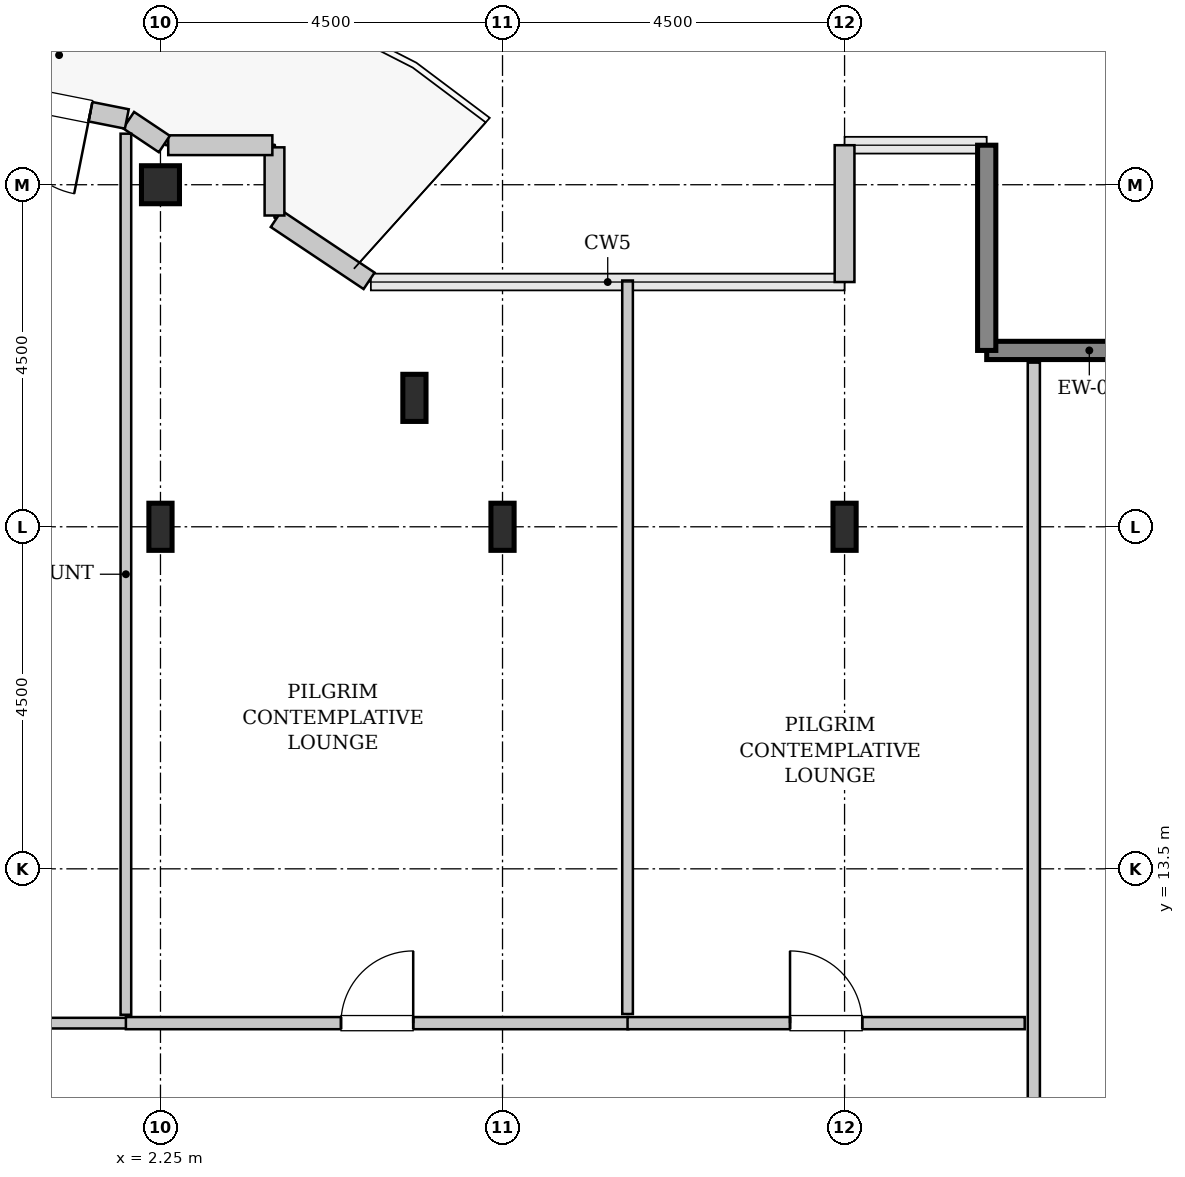
"""IFC4 building model, lengths in metres.
Left out: names, types, materials, properties, quantities, classifications, styles, units other than length and angle.
Written with IfcOpenShell. Run it as: python <this file> out.ifc"""

import sys

from ifc_helpers import new_model, si_unit, direction, frame, frame_2d, origin, origin_2d, place, context, subcontext, project, spatial, rectangle, hollow_rectangle, i_section, extrude, source, transform, mapped, element, fill, save


model = new_model("IFC4")
c1 = context("Model", 3, precision=1e-05, world=origin(), true_north=direction((0.0, 1.0)))
c2 = subcontext(c1, "Body", "Model", "MODEL_VIEW")
j1 = project(units=[si_unit("LENGTHUNIT", "METRE"), si_unit("PLANEANGLEUNIT", "RADIAN")], contexts=[c1])
p1 = place(None, origin())
s1 = spatial("IfcSite", under=j1, at=p1, CompositionType="ELEMENT")
p2 = place(p1, origin())
s2 = spatial("IfcBuilding", under=s1, at=p2, CompositionType="ELEMENT")
p3 = place(p2, frame((0.0, 0.0, 306.4)))
s3 = spatial("IfcBuildingStorey", under=s2, at=p3, CompositionType="ELEMENT", Elevation=306.4)
m1 = source(origin(), c2, "Body", "SweptSolid", [
    extrude(i_section(OverallWidth=0.305, OverallDepth=0.62, WebThickness=0.021, FlangeThickness=0.04, FilletRadius=0.027, at=origin_2d()), origin(), (0.0, 0.0, 1.0), 3.8),
])
p4 = place(p3, frame((2.25, 18.0, 0.0), z_axis=(0.0, 0.0, 1.0), x_axis=(1.0, 0.0, 0.0)))
e1 = element("IfcColumn", 1, at=p4, inside=s3, PredefinedType="COLUMN", context=c2, shape_type="MappedRepresentation", body=[
    mapped(m1, transform((0.0, 0.0, 0.0), x_axis=(1.0, 0.0, 0.0), y_axis=(0.0, 1.0, 0.0), z_axis=(0.0, 0.0, 1.0), scale=1.0)),
])
m2 = source(origin(), c2, "Body", "SweptSolid", [
    extrude(hollow_rectangle(XDim=0.5, YDim=0.5, WallThickness=0.025, InnerFilletRadius=0.025, OuterFilletRadius=0.05, at=origin_2d()), origin(), (0.0, 0.0, 1.0), 3.8),
])
p5 = place(p3, frame((2.25, 22.5, 0.0), z_axis=(0.0, 0.0, 1.0), x_axis=(1.0, 0.0, 0.0)))
e2 = element("IfcColumn", 2, at=p5, inside=s3, PredefinedType="COLUMN", context=c2, shape_type="MappedRepresentation", body=[
    mapped(m2, transform((0.0, 0.0, 0.0), x_axis=(1.0, 0.0, 0.0), y_axis=(0.0, 1.0, 0.0), z_axis=(0.0, 0.0, 1.0), scale=1.0)),
])
for number, where, z_axis, x_axis in (
    (3, (5.591, 19.696, 0.0), (0.0, 0.0, 1.0), (1.0, 0.0, 0.0)),
    (4, (6.75, 18.0, 0.0), (0.0, 0.0, 1.0), (1.0, 0.0, 0.0)),
    (5, (11.25, 18.0, 0.0), (0.0, 0.0, 1.0), (1.0, 0.0, 0.0)),
):
    element("IfcColumn", number, at=place(p3, frame(where, z_axis=z_axis, x_axis=x_axis)), inside=s3, PredefinedType="COLUMN", context=c2, shape_type="MappedRepresentation", body=[
        mapped(m1, transform((0.0, 0.0, 0.0), x_axis=(1.0, 0.0, 0.0), y_axis=(0.0, 1.0, 0.0), z_axis=(0.0, 0.0, 1.0), scale=1.0)),
    ])
m3 = source(origin(), c2, "Body", "SweptSolid", [
    extrude(rectangle(XDim=2.7, YDim=0.24, at=frame_2d((1.35, 0.0))), origin(), (0.0, 0.0, 1.0), 3.55),
])
for number, where, z_axis, x_axis in (
    (6, (15.82, 20.32, 0.0), (0.0, 0.0, 1.0), (-1.0, 0.0, 0.0)),
    (7, (13.12, 20.32, 0.0), (0.0, 0.0, 1.0), (0.0, 1.0, 0.0)),
):
    element("IfcWall", number, at=place(p3, frame(where, z_axis=z_axis, x_axis=x_axis)), inside=s3, PredefinedType="SHEAR", context=c2, shape_type="MappedRepresentation", body=[
        mapped(m3, transform((0.0, 0.0, 0.0), x_axis=(1.0, 0.0, 0.0), y_axis=(0.0, 1.0, 0.0), z_axis=(0.0, 0.0, 1.0), scale=1.0)),
    ])
m4 = source(origin(), c2, "Body", "SweptSolid", [
    extrude(rectangle(XDim=1.8, YDim=0.26, at=frame_2d((0.9, 0.0))), origin(), (0.0, 0.0, 1.0), 3.55),
])
p6 = place(p3, frame((11.25, 23.02, 0.0), z_axis=(0.0, 0.0, 1.0), x_axis=(0.0, -1.0, 0.0)))
e8 = element("IfcWall", 8, at=p6, inside=s3, PredefinedType="SOLIDWALL", context=c2, shape_type="MappedRepresentation", body=[
    mapped(m4, transform((0.0, 0.0, 0.0), x_axis=(1.0, 0.0, 0.0), y_axis=(0.0, 1.0, 0.0), z_axis=(0.0, 0.0, 1.0), scale=1.0)),
])
m5 = source(origin(), c2, "Body", "SweptSolid", [
    extrude(rectangle(XDim=1.469, YDim=0.26, at=frame_2d((0.734, 0.0))), origin(), (0.0, 0.0, 1.0), 3.55),
])
p7 = place(p3, frame((4.995, 21.236, 0.0), z_axis=(0.0, 0.0, 1.0), x_axis=(-0.831461760506, 0.555581983884, 0.0)))
e9 = element("IfcWall", 9, at=p7, inside=s3, PredefinedType="SOLIDWALL", context=c2, shape_type="MappedRepresentation", body=[
    mapped(m5, transform((0.0, 0.0, 0.0), x_axis=(1.0, 0.0, 0.0), y_axis=(0.0, 1.0, 0.0), z_axis=(0.0, 0.0, 1.0), scale=1.0)),
])
m6 = source(origin(), c2, "Body", "SweptSolid", [
    extrude(rectangle(XDim=0.897, YDim=0.26, at=frame_2d((0.448, 0.0))), origin(), (0.0, 0.0, 1.0), 3.55),
])
p8 = place(p3, frame((3.75, 22.095, 0.0), z_axis=(0.0, 0.0, 1.0), x_axis=(0.0, 1.0, 0.0)))
e10 = element("IfcWall", 10, at=p8, inside=s3, PredefinedType="SOLIDWALL", context=c2, shape_type="MappedRepresentation", body=[
    mapped(m6, transform((0.0, 0.0, 0.0), x_axis=(1.0, 0.0, 0.0), y_axis=(0.0, 1.0, 0.0), z_axis=(0.0, 0.0, 1.0), scale=1.0)),
])
m7 = source(origin(), c2, "Body", "SweptSolid", [
    extrude(rectangle(XDim=1.37, YDim=0.26, at=frame_2d((0.685, 0.0))), origin(), (0.0, 0.0, 1.0), 3.55),
])
p9 = place(p3, frame((3.722, 23.02, 0.0), z_axis=(0.0, 0.0, 1.0), x_axis=(-1.0, 0.0, 0.0)))
e11 = element("IfcWall", 11, at=p9, inside=s3, PredefinedType="SOLIDWALL", context=c2, shape_type="MappedRepresentation", body=[
    mapped(m7, transform((0.0, 0.0, 0.0), x_axis=(1.0, 0.0, 0.0), y_axis=(0.0, 1.0, 0.0), z_axis=(0.0, 0.0, 1.0), scale=1.0)),
])
m8 = source(origin(), c2, "Body", "SweptSolid", [
    extrude(rectangle(XDim=0.565, YDim=0.26, at=frame_2d((0.283, 0.0))), origin(), (0.0, 0.0, 1.0), 3.55),
])
p10 = place(p3, frame((2.301, 23.036, 0.0), z_axis=(0.0, 0.0, 1.0), x_axis=(-0.831651492666, 0.555297933317, 0.0)))
e12 = element("IfcWall", 12, at=p10, inside=s3, PredefinedType="SOLIDWALL", context=c2, shape_type="MappedRepresentation", body=[
    mapped(m8, transform((0.0, 0.0, 0.0), x_axis=(1.0, 0.0, 0.0), y_axis=(0.0, 1.0, 0.0), z_axis=(0.0, 0.0, 1.0), scale=1.0)),
])
m9 = source(origin(), c2, "Body", "SweptSolid", [
    extrude(rectangle(XDim=4.137, YDim=0.26, at=frame_2d((2.068, 0.0))), origin(), (0.0, 0.0, 1.0), 3.55),
])
p11 = place(p3, frame((1.807, 23.365, 0.0), z_axis=(0.0, 0.0, 1.0), x_axis=(-0.980782170794, 0.195105954428, 0.0)))
e13 = element("IfcWall", 13, at=p11, inside=s3, PredefinedType="SOLIDWALL", context=c2, shape_type="MappedRepresentation", body=[
    mapped(m9, transform((0.0, 0.0, 0.0), x_axis=(1.0, 0.0, 0.0), y_axis=(0.0, 1.0, 0.0), z_axis=(0.0, 0.0, 1.0), scale=1.0)),
])
p12 = place(p11, frame((0.488, 0.0, 0.0)))
e14 = element("IfcOpeningElement", 14, at=p12, cuts=e13, PredefinedType="OPENING", context=c2, shape_type="SweptSolid", body=[
    extrude(rectangle(XDim=1.1, YDim=2.2, at=frame_2d((0.55, 1.1))), frame((0.0, 0.14, 0.0), z_axis=(0.0, -1.0, 0.0), x_axis=(1.0, 0.0, 0.0)), (0.0, 0.0, 1.0), 0.28),
])
m10 = source(origin(), c2, "Body", "SweptSolid", [
    extrude(rectangle(XDim=12.922, YDim=0.16, at=frame_2d((6.461, 0.0))), origin(), (0.0, 0.0, 1.0), 3.535),
])
p13 = place(p3, frame((13.74, 7.238, 0.0), z_axis=(0.0, 0.0, 1.0), x_axis=(0.0, 1.0, 0.0)))
e15 = element("IfcWall", 15, at=p13, inside=s3, PredefinedType="PARTITIONING", context=c2, shape_type="MappedRepresentation", body=[
    mapped(m10, transform((0.0, 0.0, 0.0), x_axis=(1.0, 0.0, 0.0), y_axis=(0.0, 1.0, 0.0), z_axis=(0.0, 0.0, 1.0), scale=1.0)),
])
p14 = place(p13, frame((1.661, 0.0, 0.0)))
e16 = element("IfcOpeningElement", 16, at=p14, cuts=e15, PredefinedType="OPENING", context=c2, shape_type="SweptSolid", body=[
    extrude(rectangle(XDim=0.95, YDim=2.1, at=frame_2d((0.475, 1.05))), frame((0.0, 0.09, 0.0), z_axis=(0.0, -1.0, 0.0), x_axis=(1.0, 0.0, 0.0)), (0.0, 0.0, 1.0), 0.18),
])
m11 = source(origin(), c2, "Body", "SweptSolid", [
    extrude(rectangle(XDim=4.625, YDim=0.14, at=frame_2d((2.312, 0.0))), origin(), (0.0, 0.0, 1.0), 3.535),
])
p15 = place(p3, frame((-2.82, 11.47, 0.0), z_axis=(0.0, 0.0, 1.0), x_axis=(1.0, 0.0, 0.0)))
e17 = element("IfcWall", 17, at=p15, inside=s3, PredefinedType="PARTITIONING", context=c2, shape_type="MappedRepresentation", body=[
    mapped(m11, transform((0.0, 0.0, 0.0), x_axis=(1.0, 0.0, 0.0), y_axis=(0.0, 1.0, 0.0), z_axis=(0.0, 0.0, 1.0), scale=1.0)),
])
m12 = source(origin(), c2, "Body", "SweptSolid", [
    extrude(rectangle(XDim=11.591, YDim=0.14, at=frame_2d((5.796, 0.0))), origin(), (0.0, 0.0, 1.0), 2.975),
])
p16 = place(p3, frame((1.795, 11.58, 0.0), z_axis=(0.0, 0.0, 1.0), x_axis=(0.0, 1.0, 0.0)))
e18 = element("IfcWall", 18, at=p16, inside=s3, PredefinedType="PARTITIONING", context=c2, shape_type="MappedRepresentation", body=[
    mapped(m12, transform((0.0, 0.0, 0.0), x_axis=(1.0, 0.0, 0.0), y_axis=(0.0, 1.0, 0.0), z_axis=(0.0, 0.0, 1.0), scale=1.0)),
])
m13 = source(origin(), c2, "Body", "SweptSolid", [
    extrude(rectangle(XDim=6.61, YDim=0.16, at=frame_2d((3.305, 0.0))), origin(), (0.0, 0.0, 1.0), 3.535),
])
p17 = place(p3, frame((1.795, 11.47, 0.0), z_axis=(0.0, 0.0, 1.0), x_axis=(1.0, 0.0, 0.0)))
e19 = element("IfcWall", 19, at=p17, inside=s3, PredefinedType="PARTITIONING", context=c2, shape_type="MappedRepresentation", body=[
    mapped(m13, transform((0.0, 0.0, 0.0), x_axis=(1.0, 0.0, 0.0), y_axis=(0.0, 1.0, 0.0), z_axis=(0.0, 0.0, 1.0), scale=1.0)),
])
p18 = place(p17, frame((2.83, 0.0, 0.0)))
e20 = element("IfcOpeningElement", 20, at=p18, cuts=e19, PredefinedType="OPENING", context=c2, shape_type="SweptSolid", body=[
    extrude(rectangle(XDim=0.95, YDim=2.1, at=frame_2d((0.475, 1.05))), frame((0.0, 0.09, 0.0), z_axis=(0.0, -1.0, 0.0), x_axis=(1.0, 0.0, 0.0)), (0.0, 0.0, 1.0), 0.18),
])
m14 = source(origin(), c2, "Body", "SweptSolid", [
    extrude(rectangle(XDim=9.65, YDim=0.14, at=frame_2d((4.825, 0.0))), origin(), (0.0, 0.0, 1.0), 3.535),
])
p19 = place(p3, frame((8.395, 11.59, 0.0), z_axis=(0.0, 0.0, 1.0), x_axis=(0.0, 1.0, 0.0)))
e21 = element("IfcWall", 21, at=p19, inside=s3, PredefinedType="PARTITIONING", context=c2, shape_type="MappedRepresentation", body=[
    mapped(m14, transform((0.0, 0.0, 0.0), x_axis=(1.0, 0.0, 0.0), y_axis=(0.0, 1.0, 0.0), z_axis=(0.0, 0.0, 1.0), scale=1.0)),
])
m15 = source(origin(), c2, "Body", "SweptSolid", [
    extrude(rectangle(XDim=5.225, YDim=0.16, at=frame_2d((2.613, 0.0))), origin(), (0.0, 0.0, 1.0), 3.535),
])
p20 = place(p3, frame((8.395, 11.47, 0.0), z_axis=(0.0, 0.0, 1.0), x_axis=(1.0, 0.0, 0.0)))
e22 = element("IfcWall", 22, at=p20, inside=s3, PredefinedType="PARTITIONING", context=c2, shape_type="MappedRepresentation", body=[
    mapped(m15, transform((0.0, 0.0, 0.0), x_axis=(1.0, 0.0, 0.0), y_axis=(0.0, 1.0, 0.0), z_axis=(0.0, 0.0, 1.0), scale=1.0)),
])
p21 = place(p20, frame((2.137, 0.0, 0.0)))
e23 = element("IfcOpeningElement", 23, at=p21, cuts=e22, PredefinedType="OPENING", context=c2, shape_type="SweptSolid", body=[
    extrude(rectangle(XDim=0.95, YDim=2.1, at=frame_2d((0.475, 1.05))), frame((0.0, 0.09, 0.0), z_axis=(0.0, -1.0, 0.0), x_axis=(1.0, 0.0, 0.0)), (0.0, 0.0, 1.0), 0.18),
])
m16 = source(origin(), c2, "Body", "SweptSolid", [
    extrude(rectangle(XDim=1.1, YDim=2.2, at=frame_2d((0.55, 1.1))), frame((0.0, 0.025, 0.0), z_axis=(0.0, -1.0, 0.0), x_axis=(1.0, 0.0, 0.0)), (0.0, 0.0, 1.0), 0.05),
])
p22 = place(p12, origin())
e24 = element("IfcDoor", 24, at=p22, inside=s3, OperationType="SINGLE_SWING_LEFT", PredefinedType="DOOR", context=c2, shape_type="MappedRepresentation", body=[
    mapped(m16, transform((0.0, 0.0, 0.0), x_axis=(1.0, 0.0, 0.0), y_axis=(0.0, 1.0, 0.0), z_axis=(0.0, 0.0, 1.0), scale=1.0)),
])
fill(e14, e24)
m17 = source(origin(), c2, "Body", "SweptSolid", [
    extrude(rectangle(XDim=0.95, YDim=2.1, at=frame_2d((0.475, 1.05))), frame((0.0, 0.025, 0.0), z_axis=(0.0, -1.0, 0.0), x_axis=(1.0, 0.0, 0.0)), (0.0, 0.0, 1.0), 0.05),
])
p23 = place(p18, origin())
e25 = element("IfcDoor", 25, at=p23, inside=s3, OperationType="SINGLE_SWING_RIGHT", PredefinedType="DOOR", context=c2, shape_type="MappedRepresentation", body=[
    mapped(m17, transform((0.0, 0.0, 0.0), x_axis=(1.0, 0.0, 0.0), y_axis=(0.0, 1.0, 0.0), z_axis=(0.0, 0.0, 1.0), scale=1.0)),
])
fill(e20, e25)
p24 = place(p21, origin())
e26 = element("IfcDoor", 26, at=p24, inside=s3, OperationType="SINGLE_SWING_LEFT", PredefinedType="DOOR", context=c2, shape_type="MappedRepresentation", body=[
    mapped(m17, transform((0.0, 0.0, 0.0), x_axis=(1.0, 0.0, 0.0), y_axis=(0.0, 1.0, 0.0), z_axis=(0.0, 0.0, 1.0), scale=1.0)),
])
fill(e23, e26)
save(model, sys.argv[1])
